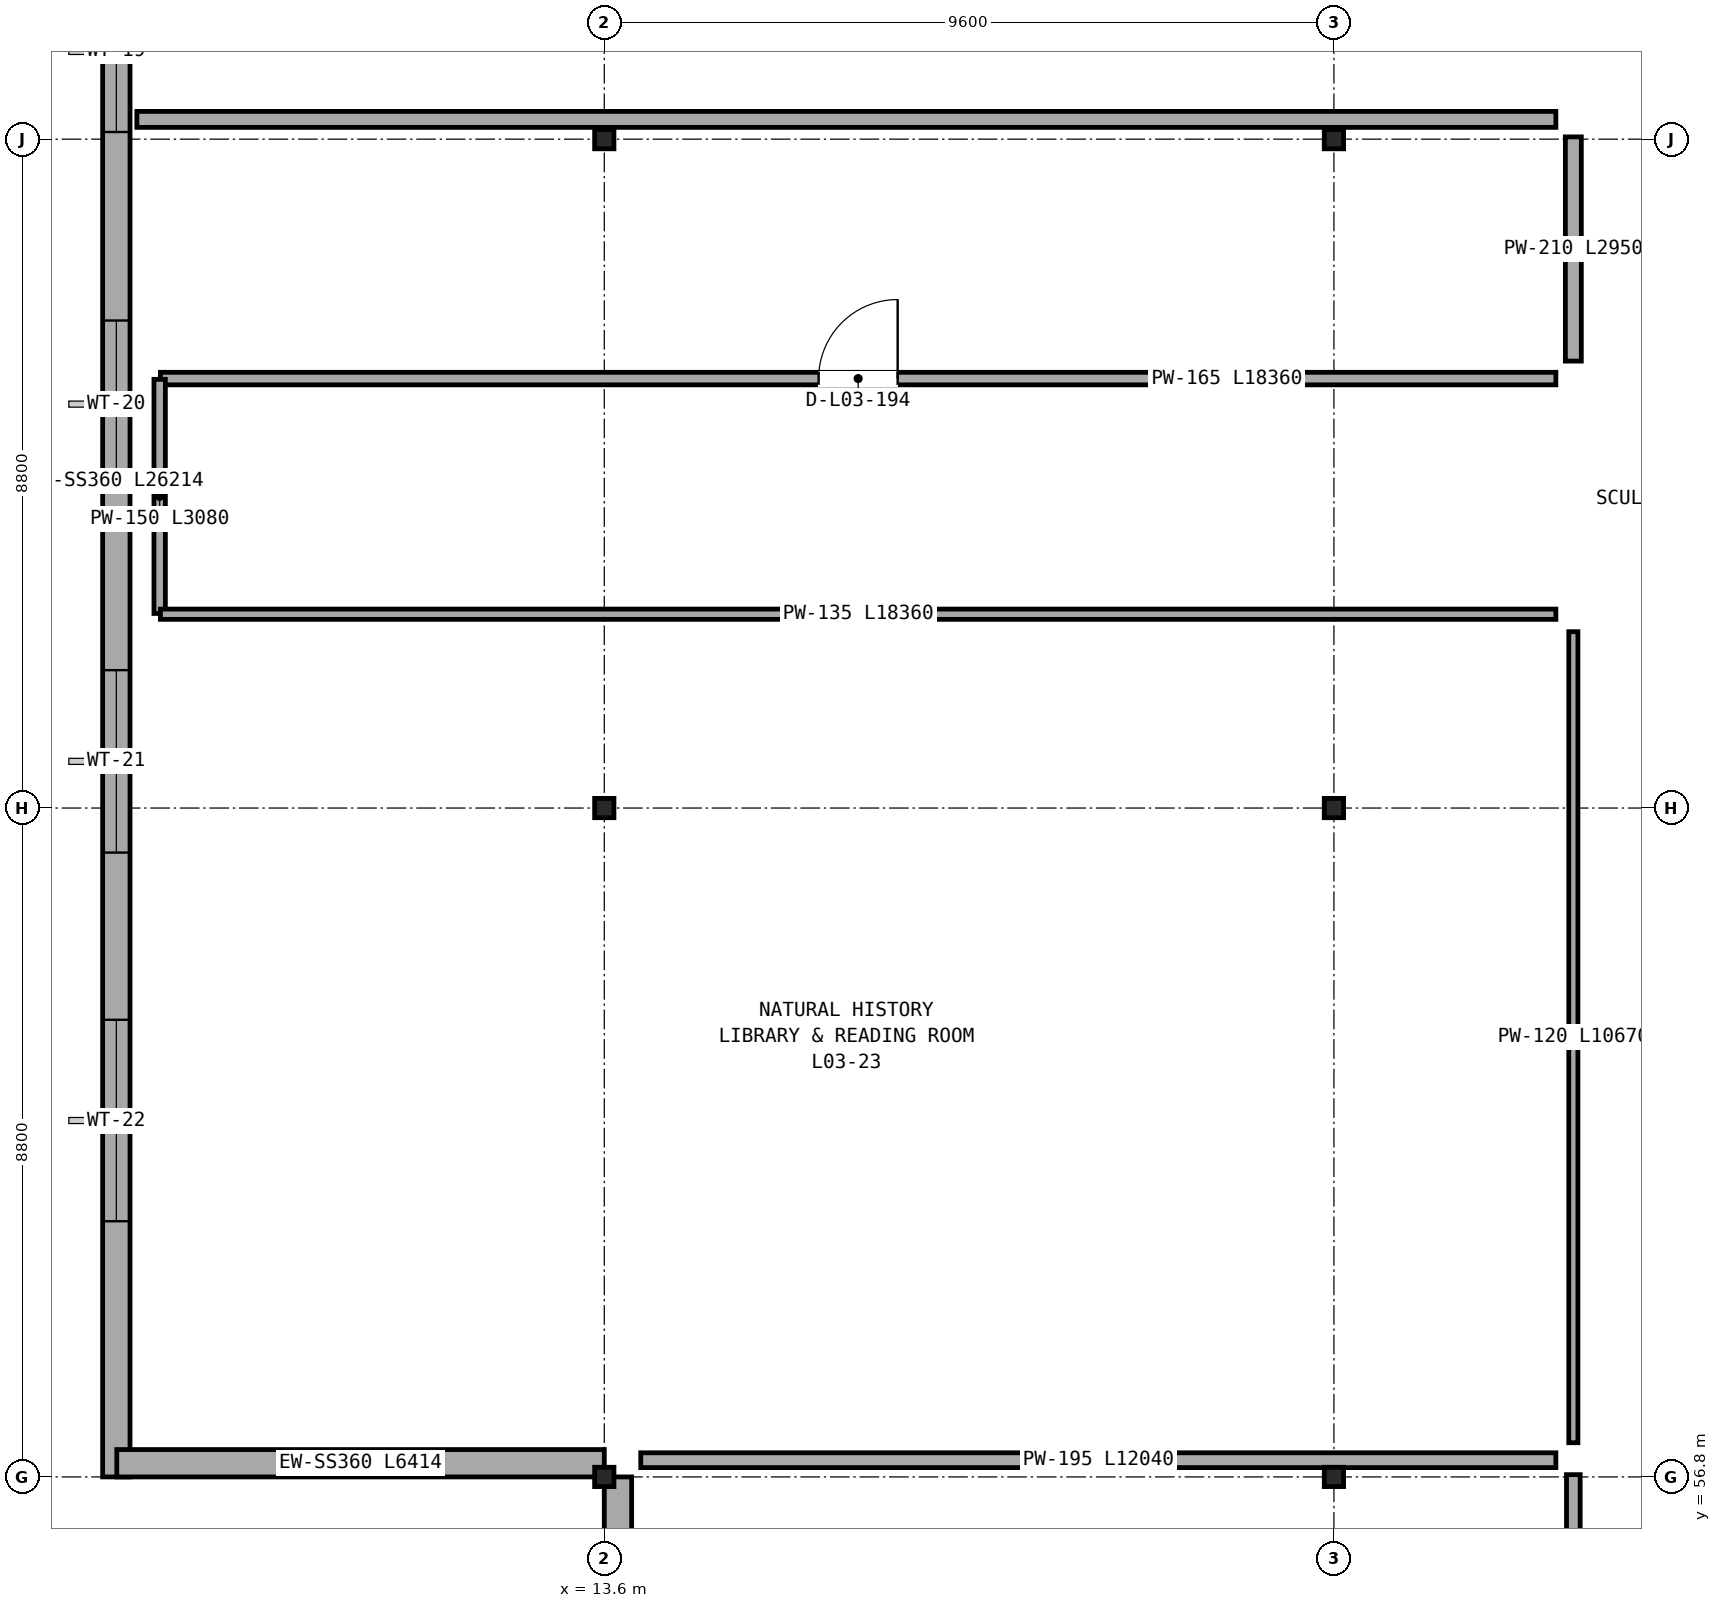
"""IFC4 building model, lengths in metres.
Left out: names, types, materials, properties, quantities, classifications, styles, units other than length and angle.
Written with IfcOpenShell. Run it as: python <this file> out.ifc"""

import sys

from ifc_helpers import new_model, si_unit, direction, frame, frame_2d, origin, origin_2d, place, context, subcontext, project, spatial, rectangle, i_section, extrude, element, fill, save


model = new_model("IFC4")
c1 = context("Model", 3, precision=1e-05, world=origin(), true_north=direction((0.0, 1.0)))
c2 = subcontext(c1, "Body", "Model", "MODEL_VIEW")
j1 = project(units=[si_unit("LENGTHUNIT", "METRE"), si_unit("PLANEANGLEUNIT", "RADIAN")], contexts=[c1])
p1 = place(None, origin())
s1 = spatial("IfcSite", under=j1, at=p1, CompositionType="ELEMENT")
p2 = place(p1, origin())
s2 = spatial("IfcBuilding", under=s1, at=p2, CompositionType="ELEMENT")
p3 = place(p2, frame((0.0, 0.0, 14.6)))
s3 = spatial("IfcBuildingStorey", under=s2, at=p3, CompositionType="ELEMENT", Elevation=14.6)
for number, where, z_axis, x_axis in (
    (1, (13.6, 56.8, 0.0), (0.0, 0.0, 1.0), (1.0, 0.0, 0.0)),
    (2, (13.6, 65.6, 0.0), (0.0, 0.0, 1.0), (1.0, 0.0, 0.0)),
    (3, (13.6, 74.4, 0.0), (0.0, 0.0, 1.0), (1.0, 0.0, 0.0)),
    (4, (23.2, 56.8, 0.0), (0.0, 0.0, 1.0), (1.0, 0.0, 0.0)),
    (5, (23.2, 65.6, 0.0), (0.0, 0.0, 1.0), (1.0, 0.0, 0.0)),
    (6, (23.2, 74.4, 0.0), (0.0, 0.0, 1.0), (1.0, 0.0, 0.0)),
):
    element("IfcColumn", number, at=place(p3, frame(where, z_axis=z_axis, x_axis=x_axis)), inside=s3, PredefinedType="COLUMN", context=c2, shape_type="SweptSolid", body=[
        extrude(i_section(OverallWidth=0.254, OverallDepth=0.254, WebThickness=0.009, FlangeThickness=0.014, FilletRadius=0.013, at=origin_2d()), origin(), (0.0, 0.0, 1.0), 4.5),
    ])
p4 = place(p3, frame((7.18, 83.014, 0.0), z_axis=(0.0, 0.0, 1.0), x_axis=(0.0, -1.0, 0.0)))
e7 = element("IfcWall", 7, at=p4, inside=s3, PredefinedType="SOLIDWALL", context=c2, shape_type="SweptSolid", body=[
    extrude(rectangle(XDim=26.214, YDim=0.36, at=frame_2d((13.107, 0.0))), origin(), (0.0, 0.0, 1.0), 3.435),
])
p5 = place(p4, frame((1.8, 0.0, 0.9)))
e8 = element("IfcOpeningElement", 8, at=p5, cuts=e7, PredefinedType="OPENING", context=c2, shape_type="SweptSolid", body=[
    extrude(rectangle(XDim=1.85, YDim=1.85, at=frame_2d((0.925, 0.925))), frame((0.0, 0.19, 0.0), z_axis=(0.0, -1.0, 0.0), x_axis=(1.0, 0.0, 0.0)), (0.0, 0.0, 1.0), 0.38),
])
p6 = place(p4, frame((6.4, 0.0, 0.9)))
e9 = element("IfcOpeningElement", 9, at=p6, cuts=e7, PredefinedType="OPENING", context=c2, shape_type="SweptSolid", body=[
    extrude(rectangle(XDim=2.12, YDim=1.85, at=frame_2d((1.06, 0.925))), frame((0.0, 0.19, 0.0), z_axis=(0.0, -1.0, 0.0), x_axis=(1.0, 0.0, 0.0)), (0.0, 0.0, 1.0), 0.38),
])
p7 = place(p4, frame((11.0, 0.0, 0.9)))
e10 = element("IfcOpeningElement", 10, at=p7, cuts=e7, PredefinedType="OPENING", context=c2, shape_type="SweptSolid", body=[
    extrude(rectangle(XDim=2.2, YDim=1.85, at=frame_2d((1.1, 0.925))), frame((0.0, 0.19, 0.0), z_axis=(0.0, -1.0, 0.0), x_axis=(1.0, 0.0, 0.0)), (0.0, 0.0, 1.0), 0.38),
])
p8 = place(p4, frame((15.6, 0.0, 0.9)))
e11 = element("IfcOpeningElement", 11, at=p8, cuts=e7, PredefinedType="OPENING", context=c2, shape_type="SweptSolid", body=[
    extrude(rectangle(XDim=2.4, YDim=1.85, at=frame_2d((1.2, 0.925))), frame((0.0, 0.19, 0.0), z_axis=(0.0, -1.0, 0.0), x_axis=(1.0, 0.0, 0.0)), (0.0, 0.0, 1.0), 0.38),
])
p9 = place(p4, frame((20.2, 0.0, 0.9)))
e12 = element("IfcOpeningElement", 12, at=p9, cuts=e7, PredefinedType="OPENING", context=c2, shape_type="SweptSolid", body=[
    extrude(rectangle(XDim=2.65, YDim=1.85, at=frame_2d((1.325, 0.925))), frame((0.0, 0.19, 0.0), z_axis=(0.0, -1.0, 0.0), x_axis=(1.0, 0.0, 0.0)), (0.0, 0.0, 1.0), 0.38),
])
p10 = place(p3, frame((7.186, 56.98, 0.0), z_axis=(0.0, 0.0, 1.0), x_axis=(1.0, 0.0, 0.0)))
e13 = element("IfcWall", 13, at=p10, inside=s3, PredefinedType="SOLIDWALL", context=c2, shape_type="SweptSolid", body=[
    extrude(rectangle(XDim=6.414, YDim=0.36, at=frame_2d((3.207, 0.0))), origin(), (0.0, 0.0, 1.0), 3.435),
])
p11 = place(p3, frame((13.78, 56.8, 0.0), z_axis=(0.0, 0.0, 1.0), x_axis=(0.0, -1.0, 0.0)))
e14 = element("IfcWall", 14, at=p11, inside=s3, PredefinedType="SOLIDWALL", context=c2, shape_type="SweptSolid", body=[
    extrude(rectangle(XDim=17.6, YDim=0.36, at=frame_2d((8.8, 0.0))), origin(), (0.0, 0.0, 1.0), 3.435),
])
p12 = place(p11, frame((1.8, 0.0, 0.9)))
e15 = element("IfcOpeningElement", 15, at=p12, cuts=e14, PredefinedType="OPENING", context=c2, shape_type="SweptSolid", body=[
    extrude(rectangle(XDim=0.95, YDim=2.15, at=frame_2d((0.475, 1.075))), frame((0.0, 0.19, 0.0), z_axis=(0.0, -1.0, 0.0), x_axis=(1.0, 0.0, 0.0)), (0.0, 0.0, 1.0), 0.38),
])
p13 = place(p3, frame((26.12, 71.25, 0.0), z_axis=(0.0, 0.0, 1.0), x_axis=(-1.0, 0.0, 0.0)))
e16 = element("IfcWall", 16, at=p13, inside=s3, PredefinedType="PARTITIONING", context=c2, shape_type="SweptSolid", body=[
    extrude(rectangle(XDim=18.36, YDim=0.165, at=frame_2d((9.18, 0.0))), origin(), (0.0, 0.0, 1.0), 3.763),
])
p14 = place(p13, frame((8.66, 0.0, 0.0)))
e17 = element("IfcOpeningElement", 17, at=p14, cuts=e16, PredefinedType="OPENING", context=c2, shape_type="SweptSolid", body=[
    extrude(rectangle(XDim=1.04, YDim=2.08, at=frame_2d((0.52, 1.04))), frame((0.0, 0.093, 0.0), z_axis=(0.0, -1.0, 0.0), x_axis=(1.0, 0.0, 0.0)), (0.0, 0.0, 1.0), 0.185),
])
p15 = place(p3, frame((7.75, 71.24, 0.0), z_axis=(0.0, 0.0, 1.0), x_axis=(0.0, -1.0, 0.0)))
e18 = element("IfcWall", 18, at=p15, inside=s3, PredefinedType="PARTITIONING", context=c2, shape_type="SweptSolid", body=[
    extrude(rectangle(XDim=3.08, YDim=0.15, at=frame_2d((1.54, 0.0))), origin(), (0.0, 0.0, 1.0), 4.13),
])
p16 = place(p3, frame((7.76, 68.15, 0.0), z_axis=(0.0, 0.0, 1.0), x_axis=(1.0, 0.0, 0.0)))
e19 = element("IfcWall", 19, at=p16, inside=s3, PredefinedType="PARTITIONING", context=c2, shape_type="SweptSolid", body=[
    extrude(rectangle(XDim=18.36, YDim=0.135, at=frame_2d((9.18, 0.0))), origin(), (0.0, 0.0, 1.0), 3.763),
])
p17 = place(p3, frame((26.35, 67.92, 0.0), z_axis=(0.0, 0.0, 1.0), x_axis=(0.0, -1.0, 0.0)))
e20 = element("IfcWall", 20, at=p17, inside=s3, PredefinedType="PARTITIONING", context=c2, shape_type="SweptSolid", body=[
    extrude(rectangle(XDim=10.67, YDim=0.12, at=frame_2d((5.335, 0.0))), origin(), (0.0, 0.0, 1.0), 3.42),
])
p18 = place(p3, frame((26.35, 74.43, 0.0), z_axis=(0.0, 0.0, 1.0), x_axis=(0.0, -1.0, 0.0)))
e21 = element("IfcWall", 21, at=p18, inside=s3, PredefinedType="PARTITIONING", context=c2, shape_type="SweptSolid", body=[
    extrude(rectangle(XDim=2.95, YDim=0.21, at=frame_2d((1.475, 0.0))), origin(), (0.0, 0.0, 1.0), 3.42),
])
p19 = place(p3, frame((26.35, 56.83, 0.0), z_axis=(0.0, 0.0, 1.0), x_axis=(0.0, -1.0, 0.0)))
e22 = element("IfcWall", 22, at=p19, inside=s3, PredefinedType="PARTITIONING", context=c2, shape_type="SweptSolid", body=[
    extrude(rectangle(XDim=2.35, YDim=0.18, at=frame_2d((1.175, 0.0))), origin(), (0.0, 0.0, 1.0), 3.42),
])
p20 = place(p3, frame((7.45, 74.66, 0.0), z_axis=(0.0, 0.0, 1.0), x_axis=(1.0, 0.0, 0.0)))
e23 = element("IfcWall", 23, at=p20, inside=s3, PredefinedType="PARTITIONING", context=c2, shape_type="SweptSolid", body=[
    extrude(rectangle(XDim=18.67, YDim=0.21, at=frame_2d((9.335, 0.0))), origin(), (0.0, 0.0, 1.0), 3.42),
])
p21 = place(p3, frame((26.12, 57.02, 0.0), z_axis=(0.0, 0.0, 1.0), x_axis=(-1.0, 0.0, 0.0)))
e24 = element("IfcWall", 24, at=p21, inside=s3, PredefinedType="PARTITIONING", context=c2, shape_type="SweptSolid", body=[
    extrude(rectangle(XDim=12.04, YDim=0.195, at=frame_2d((6.02, 0.0))), origin(), (0.0, 0.0, 1.0), 3.42),
])
p22 = place(p6, origin())
e25 = element("IfcWindow", 25, at=p22, inside=s3, PartitioningType="SINGLE_PANEL", PredefinedType="WINDOW", context=c2, shape_type="SweptSolid", body=[
    extrude(rectangle(XDim=2.12, YDim=1.85, at=frame_2d((1.06, 0.925))), frame((0.0, 0.03, 0.0), z_axis=(0.0, -1.0, 0.0), x_axis=(1.0, 0.0, 0.0)), (0.0, 0.0, 1.0), 0.06),
])
fill(e9, e25)
p23 = place(p7, origin())
e26 = element("IfcWindow", 26, at=p23, inside=s3, PartitioningType="SINGLE_PANEL", PredefinedType="WINDOW", context=c2, shape_type="SweptSolid", body=[
    extrude(rectangle(XDim=2.2, YDim=1.85, at=frame_2d((1.1, 0.925))), frame((0.0, 0.03, 0.0), z_axis=(0.0, -1.0, 0.0), x_axis=(1.0, 0.0, 0.0)), (0.0, 0.0, 1.0), 0.06),
])
fill(e10, e26)
p24 = place(p8, origin())
e27 = element("IfcWindow", 27, at=p24, inside=s3, PartitioningType="SINGLE_PANEL", PredefinedType="WINDOW", context=c2, shape_type="SweptSolid", body=[
    extrude(rectangle(XDim=2.4, YDim=1.85, at=frame_2d((1.2, 0.925))), frame((0.0, 0.03, 0.0), z_axis=(0.0, -1.0, 0.0), x_axis=(1.0, 0.0, 0.0)), (0.0, 0.0, 1.0), 0.06),
])
fill(e11, e27)
p25 = place(p9, origin())
e28 = element("IfcWindow", 28, at=p25, inside=s3, PartitioningType="SINGLE_PANEL", PredefinedType="WINDOW", context=c2, shape_type="SweptSolid", body=[
    extrude(rectangle(XDim=2.65, YDim=1.85, at=frame_2d((1.325, 0.925))), frame((0.0, 0.03, 0.0), z_axis=(0.0, -1.0, 0.0), x_axis=(1.0, 0.0, 0.0)), (0.0, 0.0, 1.0), 0.06),
])
fill(e12, e28)
p26 = place(p14, frame((1.04, 0.0, 0.0), z_axis=(0.0, 0.0, 1.0), x_axis=(-1.0, 0.0, 0.0)))
e29 = element("IfcDoor", 29, at=p26, inside=s3, OperationType="SINGLE_SWING_LEFT", PredefinedType="DOOR", context=c2, shape_type="SweptSolid", body=[
    extrude(rectangle(XDim=1.04, YDim=2.08, at=frame_2d((0.52, 1.04))), frame((0.0, 0.025, 0.0), z_axis=(0.0, -1.0, 0.0), x_axis=(1.0, 0.0, 0.0)), (0.0, 0.0, 1.0), 0.05),
])
fill(e17, e29)
save(model, sys.argv[1])
